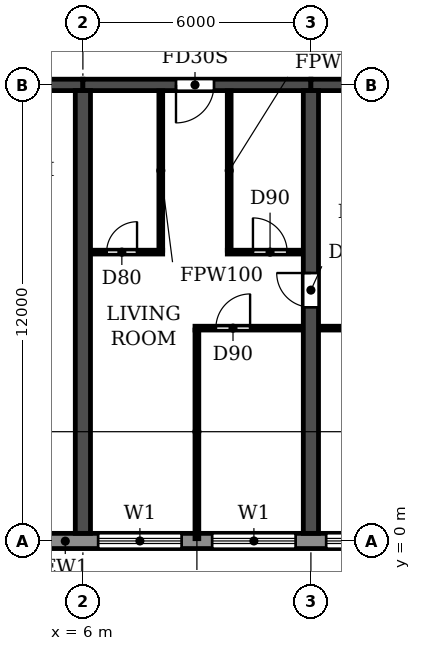
"""IFC4 building model, lengths in metres.
Left out: names, types, materials, properties, quantities, classifications, styles, units other than length and angle.
Written with IfcOpenShell. Run it as: python <this file> out.ifc"""

import sys

from ifc_helpers import new_model, si_unit, direction, frame, frame_2d, origin, place, context, subcontext, project, spatial, rectangle, extrude, element, fill, save


model = new_model("IFC4")
c1 = context("Model", 3, precision=1e-05, world=origin(), true_north=direction((0.0, 1.0)))
c2 = subcontext(c1, "Body", "Model", "MODEL_VIEW")
j1 = project(units=[si_unit("LENGTHUNIT", "METRE"), si_unit("PLANEANGLEUNIT", "RADIAN")], contexts=[c1])
p1 = place(None, origin())
s1 = spatial("IfcSite", under=j1, at=p1, CompositionType="ELEMENT")
p2 = place(p1, origin())
s2 = spatial("IfcBuilding", under=s1, at=p2, CompositionType="ELEMENT")
p3 = place(p2, frame((0.0, 0.0, 23.4)))
s3 = spatial("IfcBuildingStorey", under=s2, at=p3, CompositionType="ELEMENT", Elevation=23.4)
p4 = place(p3, frame((6.0, 0.2, 0.0), z_axis=(0.0, 0.0, 1.0), x_axis=(0.0, 1.0, 0.0)))
e1 = element("IfcWall", 1, at=p4, inside=s3, PredefinedType="SHEAR", context=c2, shape_type="SweptSolid", body=[
    extrude(rectangle(XDim=11.65, YDim=0.4, at=frame_2d((5.825, 0.0))), origin(), (0.0, 0.0, 1.0), 3.05),
])
p5 = place(p3, frame((12.0, 0.2, 0.0), z_axis=(0.0, 0.0, 1.0), x_axis=(0.0, 1.0, 0.0)))
e2 = element("IfcWall", 2, at=p5, inside=s3, PredefinedType="SHEAR", context=c2, shape_type="SweptSolid", body=[
    extrude(rectangle(XDim=11.65, YDim=0.4, at=frame_2d((5.825, 0.0))), origin(), (0.0, 0.0, 1.0), 3.05),
])
p6 = place(p5, frame((5.95, 0.0, 0.0)))
e3 = element("IfcOpeningElement", 3, at=p6, cuts=e2, PredefinedType="OPENING", context=c2, shape_type="SweptSolid", body=[
    extrude(rectangle(XDim=0.9, YDim=2.1, at=frame_2d((0.45, 1.05))), frame((0.0, 0.21, 0.0), z_axis=(0.0, -1.0, 0.0), x_axis=(1.0, 0.0, 0.0)), (0.0, 0.0, 1.0), 0.42),
])
p7 = place(p3, frame((0.2, 12.0, 0.0), z_axis=(0.0, 0.0, 1.0), x_axis=(1.0, 0.0, 0.0)))
e4 = element("IfcWall", 4, at=p7, inside=s3, PredefinedType="SHEAR", context=c2, shape_type="SweptSolid", body=[
    extrude(rectangle(XDim=5.8, YDim=0.3, at=frame_2d((2.9, 0.0))), origin(), (0.0, 0.0, 1.0), 2.45),
])
p8 = place(p7, frame((2.3, 0.0, 0.0)))
e5 = element("IfcOpeningElement", 5, at=p8, cuts=e4, PredefinedType="OPENING", context=c2, shape_type="SweptSolid", body=[
    extrude(rectangle(XDim=1.0, YDim=2.1, at=frame_2d((0.5, 1.05))), frame((0.0, 0.16, 0.0), z_axis=(0.0, -1.0, 0.0), x_axis=(1.0, 0.0, 0.0)), (0.0, 0.0, 1.0), 0.32),
])
p9 = place(p3, frame((6.0, 12.0, 0.0), z_axis=(0.0, 0.0, 1.0), x_axis=(1.0, 0.0, 0.0)))
e6 = element("IfcWall", 6, at=p9, inside=s3, PredefinedType="SHEAR", context=c2, shape_type="SweptSolid", body=[
    extrude(rectangle(XDim=6.0, YDim=0.3, at=frame_2d((3.0, 0.0))), origin(), (0.0, 0.0, 1.0), 2.45),
])
p10 = place(p9, frame((2.45, 0.0, 0.0)))
e7 = element("IfcOpeningElement", 7, at=p10, cuts=e6, PredefinedType="OPENING", context=c2, shape_type="SweptSolid", body=[
    extrude(rectangle(XDim=1.0, YDim=2.1, at=frame_2d((0.5, 1.05))), frame((0.0, 0.16, 0.0), z_axis=(0.0, -1.0, 0.0), x_axis=(1.0, 0.0, 0.0)), (0.0, 0.0, 1.0), 0.32),
])
p11 = place(p3, frame((12.0, 12.0, 0.0), z_axis=(0.0, 0.0, 1.0), x_axis=(1.0, 0.0, 0.0)))
e8 = element("IfcWall", 8, at=p11, inside=s3, PredefinedType="SHEAR", context=c2, shape_type="SweptSolid", body=[
    extrude(rectangle(XDim=6.0, YDim=0.3, at=frame_2d((3.0, 0.0))), origin(), (0.0, 0.0, 1.0), 2.45),
])
p12 = place(p3, frame((4.683, 0.0, 0.0), z_axis=(0.0, 0.0, 1.0), x_axis=(1.0, 0.0, 0.0)))
e9 = element("IfcWall", 9, at=p12, inside=s3, PredefinedType="STANDARD", context=c2, shape_type="SweptSolid", body=[
    extrude(rectangle(XDim=92.634, YDim=0.4, at=frame_2d((46.317, 0.0))), origin(), (0.0, 0.0, 1.0), 3.05),
])
p13 = place(p12, frame((1.717, 0.0, 0.9)))
e10 = element("IfcOpeningElement", 10, at=p13, cuts=e9, PredefinedType="OPENING", context=c2, shape_type="SweptSolid", body=[
    extrude(rectangle(XDim=2.2, YDim=1.5, at=frame_2d((1.1, 0.75))), frame((0.0, 0.21, 0.0), z_axis=(0.0, -1.0, 0.0), x_axis=(1.0, 0.0, 0.0)), (0.0, 0.0, 1.0), 0.42),
])
p14 = place(p12, frame((4.717, 0.0, 0.9)))
e11 = element("IfcOpeningElement", 11, at=p14, cuts=e9, PredefinedType="OPENING", context=c2, shape_type="SweptSolid", body=[
    extrude(rectangle(XDim=2.2, YDim=1.5, at=frame_2d((1.1, 0.75))), frame((0.0, 0.21, 0.0), z_axis=(0.0, -1.0, 0.0), x_axis=(1.0, 0.0, 0.0)), (0.0, 0.0, 1.0), 0.42),
])
p15 = place(p12, frame((7.717, 0.0, 0.9)))
e12 = element("IfcOpeningElement", 12, at=p15, cuts=e9, PredefinedType="OPENING", context=c2, shape_type="SweptSolid", body=[
    extrude(rectangle(XDim=2.2, YDim=1.5, at=frame_2d((1.1, 0.75))), frame((0.0, 0.21, 0.0), z_axis=(0.0, -1.0, 0.0), x_axis=(1.0, 0.0, 0.0)), (0.0, 0.0, 1.0), 0.42),
])
p16 = place(p12, frame((10.717, 0.0, 0.9)))
e13 = element("IfcOpeningElement", 13, at=p16, cuts=e9, PredefinedType="OPENING", context=c2, shape_type="SweptSolid", body=[
    extrude(rectangle(XDim=2.2, YDim=1.5, at=frame_2d((1.1, 0.75))), frame((0.0, 0.21, 0.0), z_axis=(0.0, -1.0, 0.0), x_axis=(1.0, 0.0, 0.0)), (0.0, 0.0, 1.0), 0.42),
])
p17 = place(p12, frame((13.717, 0.0, 0.9)))
e14 = element("IfcOpeningElement", 14, at=p17, cuts=e9, PredefinedType="OPENING", context=c2, shape_type="SweptSolid", body=[
    extrude(rectangle(XDim=2.2, YDim=1.5, at=frame_2d((1.1, 0.75))), frame((0.0, 0.21, 0.0), z_axis=(0.0, -1.0, 0.0), x_axis=(1.0, 0.0, 0.0)), (0.0, 0.0, 1.0), 0.42),
])
p18 = place(p12, frame((16.717, 0.0, 0.9)))
e15 = element("IfcOpeningElement", 15, at=p18, cuts=e9, PredefinedType="OPENING", context=c2, shape_type="SweptSolid", body=[
    extrude(rectangle(XDim=2.2, YDim=1.5, at=frame_2d((1.1, 0.75))), frame((0.0, 0.21, 0.0), z_axis=(0.0, -1.0, 0.0), x_axis=(1.0, 0.0, 0.0)), (0.0, 0.0, 1.0), 0.42),
])
p19 = place(p12, frame((19.917, 0.0, 0.0)))
e16 = element("IfcOpeningElement", 16, at=p19, cuts=e9, PredefinedType="OPENING", context=c2, shape_type="SweptSolid", body=[
    extrude(rectangle(XDim=1.8, YDim=2.4, at=frame_2d((0.9, 1.2))), frame((0.0, 0.21, 0.0), z_axis=(0.0, -1.0, 0.0), x_axis=(1.0, 0.0, 0.0)), (0.0, 0.0, 1.0), 0.42),
])
p20 = place(p12, frame((22.717, 0.0, 0.9)))
e17 = element("IfcOpeningElement", 17, at=p20, cuts=e9, PredefinedType="OPENING", context=c2, shape_type="SweptSolid", body=[
    extrude(rectangle(XDim=2.2, YDim=1.5, at=frame_2d((1.1, 0.75))), frame((0.0, 0.21, 0.0), z_axis=(0.0, -1.0, 0.0), x_axis=(1.0, 0.0, 0.0)), (0.0, 0.0, 1.0), 0.42),
])
p21 = place(p12, frame((25.717, 0.0, 0.9)))
e18 = element("IfcOpeningElement", 18, at=p21, cuts=e9, PredefinedType="OPENING", context=c2, shape_type="SweptSolid", body=[
    extrude(rectangle(XDim=2.2, YDim=1.5, at=frame_2d((1.1, 0.75))), frame((0.0, 0.21, 0.0), z_axis=(0.0, -1.0, 0.0), x_axis=(1.0, 0.0, 0.0)), (0.0, 0.0, 1.0), 0.42),
])
p22 = place(p12, frame((28.717, 0.0, 0.9)))
e19 = element("IfcOpeningElement", 19, at=p22, cuts=e9, PredefinedType="OPENING", context=c2, shape_type="SweptSolid", body=[
    extrude(rectangle(XDim=2.2, YDim=1.5, at=frame_2d((1.1, 0.75))), frame((0.0, 0.21, 0.0), z_axis=(0.0, -1.0, 0.0), x_axis=(1.0, 0.0, 0.0)), (0.0, 0.0, 1.0), 0.42),
])
p23 = place(p12, frame((31.917, 0.0, 0.0)))
e20 = element("IfcOpeningElement", 20, at=p23, cuts=e9, PredefinedType="OPENING", context=c2, shape_type="SweptSolid", body=[
    extrude(rectangle(XDim=1.8, YDim=2.4, at=frame_2d((0.9, 1.2))), frame((0.0, 0.21, 0.0), z_axis=(0.0, -1.0, 0.0), x_axis=(1.0, 0.0, 0.0)), (0.0, 0.0, 1.0), 0.42),
])
p24 = place(p12, frame((34.717, 0.0, 0.9)))
e21 = element("IfcOpeningElement", 21, at=p24, cuts=e9, PredefinedType="OPENING", context=c2, shape_type="SweptSolid", body=[
    extrude(rectangle(XDim=2.2, YDim=1.5, at=frame_2d((1.1, 0.75))), frame((0.0, 0.21, 0.0), z_axis=(0.0, -1.0, 0.0), x_axis=(1.0, 0.0, 0.0)), (0.0, 0.0, 1.0), 0.42),
])
p25 = place(p12, frame((37.717, 0.0, 0.9)))
e22 = element("IfcOpeningElement", 22, at=p25, cuts=e9, PredefinedType="OPENING", context=c2, shape_type="SweptSolid", body=[
    extrude(rectangle(XDim=2.2, YDim=1.5, at=frame_2d((1.1, 0.75))), frame((0.0, 0.21, 0.0), z_axis=(0.0, -1.0, 0.0), x_axis=(1.0, 0.0, 0.0)), (0.0, 0.0, 1.0), 0.42),
])
p26 = place(p12, frame((40.717, 0.0, 0.9)))
e23 = element("IfcOpeningElement", 23, at=p26, cuts=e9, PredefinedType="OPENING", context=c2, shape_type="SweptSolid", body=[
    extrude(rectangle(XDim=2.2, YDim=1.5, at=frame_2d((1.1, 0.75))), frame((0.0, 0.21, 0.0), z_axis=(0.0, -1.0, 0.0), x_axis=(1.0, 0.0, 0.0)), (0.0, 0.0, 1.0), 0.42),
])
p27 = place(p12, frame((43.917, 0.0, 0.0)))
e24 = element("IfcOpeningElement", 24, at=p27, cuts=e9, PredefinedType="OPENING", context=c2, shape_type="SweptSolid", body=[
    extrude(rectangle(XDim=1.8, YDim=2.4, at=frame_2d((0.9, 1.2))), frame((0.0, 0.21, 0.0), z_axis=(0.0, -1.0, 0.0), x_axis=(1.0, 0.0, 0.0)), (0.0, 0.0, 1.0), 0.42),
])
p28 = place(p12, frame((46.717, 0.0, 0.9)))
e25 = element("IfcOpeningElement", 25, at=p28, cuts=e9, PredefinedType="OPENING", context=c2, shape_type="SweptSolid", body=[
    extrude(rectangle(XDim=2.2, YDim=1.5, at=frame_2d((1.1, 0.75))), frame((0.0, 0.21, 0.0), z_axis=(0.0, -1.0, 0.0), x_axis=(1.0, 0.0, 0.0)), (0.0, 0.0, 1.0), 0.42),
])
p29 = place(p12, frame((49.717, 0.0, 0.9)))
e26 = element("IfcOpeningElement", 26, at=p29, cuts=e9, PredefinedType="OPENING", context=c2, shape_type="SweptSolid", body=[
    extrude(rectangle(XDim=2.2, YDim=1.5, at=frame_2d((1.1, 0.75))), frame((0.0, 0.21, 0.0), z_axis=(0.0, -1.0, 0.0), x_axis=(1.0, 0.0, 0.0)), (0.0, 0.0, 1.0), 0.42),
])
p30 = place(p12, frame((52.717, 0.0, 0.9)))
e27 = element("IfcOpeningElement", 27, at=p30, cuts=e9, PredefinedType="OPENING", context=c2, shape_type="SweptSolid", body=[
    extrude(rectangle(XDim=2.2, YDim=1.5, at=frame_2d((1.1, 0.75))), frame((0.0, 0.21, 0.0), z_axis=(0.0, -1.0, 0.0), x_axis=(1.0, 0.0, 0.0)), (0.0, 0.0, 1.0), 0.42),
])
p31 = place(p12, frame((55.717, 0.0, 0.9)))
e28 = element("IfcOpeningElement", 28, at=p31, cuts=e9, PredefinedType="OPENING", context=c2, shape_type="SweptSolid", body=[
    extrude(rectangle(XDim=2.2, YDim=1.5, at=frame_2d((1.1, 0.75))), frame((0.0, 0.21, 0.0), z_axis=(0.0, -1.0, 0.0), x_axis=(1.0, 0.0, 0.0)), (0.0, 0.0, 1.0), 0.42),
])
p32 = place(p12, frame((58.917, 0.0, 0.0)))
e29 = element("IfcOpeningElement", 29, at=p32, cuts=e9, PredefinedType="OPENING", context=c2, shape_type="SweptSolid", body=[
    extrude(rectangle(XDim=1.8, YDim=2.4, at=frame_2d((0.9, 1.2))), frame((0.0, 0.21, 0.0), z_axis=(0.0, -1.0, 0.0), x_axis=(1.0, 0.0, 0.0)), (0.0, 0.0, 1.0), 0.42),
])
p33 = place(p12, frame((61.717, 0.0, 0.9)))
e30 = element("IfcOpeningElement", 30, at=p33, cuts=e9, PredefinedType="OPENING", context=c2, shape_type="SweptSolid", body=[
    extrude(rectangle(XDim=2.2, YDim=1.5, at=frame_2d((1.1, 0.75))), frame((0.0, 0.21, 0.0), z_axis=(0.0, -1.0, 0.0), x_axis=(1.0, 0.0, 0.0)), (0.0, 0.0, 1.0), 0.42),
])
p34 = place(p12, frame((64.717, 0.0, 0.9)))
e31 = element("IfcOpeningElement", 31, at=p34, cuts=e9, PredefinedType="OPENING", context=c2, shape_type="SweptSolid", body=[
    extrude(rectangle(XDim=2.2, YDim=1.5, at=frame_2d((1.1, 0.75))), frame((0.0, 0.21, 0.0), z_axis=(0.0, -1.0, 0.0), x_axis=(1.0, 0.0, 0.0)), (0.0, 0.0, 1.0), 0.42),
])
p35 = place(p12, frame((67.717, 0.0, 0.9)))
e32 = element("IfcOpeningElement", 32, at=p35, cuts=e9, PredefinedType="OPENING", context=c2, shape_type="SweptSolid", body=[
    extrude(rectangle(XDim=2.2, YDim=1.5, at=frame_2d((1.1, 0.75))), frame((0.0, 0.21, 0.0), z_axis=(0.0, -1.0, 0.0), x_axis=(1.0, 0.0, 0.0)), (0.0, 0.0, 1.0), 0.42),
])
p36 = place(p12, frame((70.917, 0.0, 0.0)))
e33 = element("IfcOpeningElement", 33, at=p36, cuts=e9, PredefinedType="OPENING", context=c2, shape_type="SweptSolid", body=[
    extrude(rectangle(XDim=1.8, YDim=2.4, at=frame_2d((0.9, 1.2))), frame((0.0, 0.21, 0.0), z_axis=(0.0, -1.0, 0.0), x_axis=(1.0, 0.0, 0.0)), (0.0, 0.0, 1.0), 0.42),
])
p37 = place(p12, frame((73.717, 0.0, 0.9)))
e34 = element("IfcOpeningElement", 34, at=p37, cuts=e9, PredefinedType="OPENING", context=c2, shape_type="SweptSolid", body=[
    extrude(rectangle(XDim=2.2, YDim=1.5, at=frame_2d((1.1, 0.75))), frame((0.0, 0.21, 0.0), z_axis=(0.0, -1.0, 0.0), x_axis=(1.0, 0.0, 0.0)), (0.0, 0.0, 1.0), 0.42),
])
p38 = place(p12, frame((76.717, 0.0, 0.9)))
e35 = element("IfcOpeningElement", 35, at=p38, cuts=e9, PredefinedType="OPENING", context=c2, shape_type="SweptSolid", body=[
    extrude(rectangle(XDim=2.2, YDim=1.5, at=frame_2d((1.1, 0.75))), frame((0.0, 0.21, 0.0), z_axis=(0.0, -1.0, 0.0), x_axis=(1.0, 0.0, 0.0)), (0.0, 0.0, 1.0), 0.42),
])
p39 = place(p12, frame((79.717, 0.0, 0.9)))
e36 = element("IfcOpeningElement", 36, at=p39, cuts=e9, PredefinedType="OPENING", context=c2, shape_type="SweptSolid", body=[
    extrude(rectangle(XDim=2.2, YDim=1.5, at=frame_2d((1.1, 0.75))), frame((0.0, 0.21, 0.0), z_axis=(0.0, -1.0, 0.0), x_axis=(1.0, 0.0, 0.0)), (0.0, 0.0, 1.0), 0.42),
])
p40 = place(p12, frame((82.717, 0.0, 0.9)))
e37 = element("IfcOpeningElement", 37, at=p40, cuts=e9, PredefinedType="OPENING", context=c2, shape_type="SweptSolid", body=[
    extrude(rectangle(XDim=2.2, YDim=1.5, at=frame_2d((1.1, 0.75))), frame((0.0, 0.21, 0.0), z_axis=(0.0, -1.0, 0.0), x_axis=(1.0, 0.0, 0.0)), (0.0, 0.0, 1.0), 0.42),
])
p41 = place(p12, frame((85.717, 0.0, 0.9)))
e38 = element("IfcOpeningElement", 38, at=p41, cuts=e9, PredefinedType="OPENING", context=c2, shape_type="SweptSolid", body=[
    extrude(rectangle(XDim=2.2, YDim=1.5, at=frame_2d((1.1, 0.75))), frame((0.0, 0.21, 0.0), z_axis=(0.0, -1.0, 0.0), x_axis=(1.0, 0.0, 0.0)), (0.0, 0.0, 1.0), 0.42),
])
p42 = place(p12, frame((88.717, 0.0, 0.9)))
e39 = element("IfcOpeningElement", 39, at=p42, cuts=e9, PredefinedType="OPENING", context=c2, shape_type="SweptSolid", body=[
    extrude(rectangle(XDim=2.2, YDim=1.5, at=frame_2d((1.1, 0.75))), frame((0.0, 0.21, 0.0), z_axis=(0.0, -1.0, 0.0), x_axis=(1.0, 0.0, 0.0)), (0.0, 0.0, 1.0), 0.42),
])
p43 = place(p3, frame((8.95, 5.6, 0.0), z_axis=(0.0, 0.0, 1.0), x_axis=(1.0, 0.0, 0.0)))
e40 = element("IfcWall", 40, at=p43, inside=s3, PredefinedType="PARTITIONING", context=c2, shape_type="SweptSolid", body=[
    extrude(rectangle(XDim=2.84, YDim=0.1, at=frame_2d((1.42, 0.0))), origin(), (0.0, 0.0, 1.0), 3.05),
])
p44 = place(p43, frame((0.55, 0.0, 0.0)))
e41 = element("IfcOpeningElement", 41, at=p44, cuts=e40, PredefinedType="OPENING", context=c2, shape_type="SweptSolid", body=[
    extrude(rectangle(XDim=0.9, YDim=2.1, at=frame_2d((0.45, 1.05))), frame((0.0, 0.06, 0.0), z_axis=(0.0, -1.0, 0.0), x_axis=(1.0, 0.0, 0.0)), (0.0, 0.0, 1.0), 0.12),
])
p45 = place(p3, frame((12.21, 5.6, 0.0), z_axis=(0.0, 0.0, 1.0), x_axis=(1.0, 0.0, 0.0)))
e42 = element("IfcWall", 42, at=p45, inside=s3, PredefinedType="PARTITIONING", context=c2, shape_type="SweptSolid", body=[
    extrude(rectangle(XDim=5.58, YDim=0.1, at=frame_2d((2.79, 0.0))), origin(), (0.0, 0.0, 1.0), 3.05),
])
p46 = place(p45, frame((1.39, 0.0, 0.0)))
e43 = element("IfcOpeningElement", 43, at=p46, cuts=e42, PredefinedType="OPENING", context=c2, shape_type="SweptSolid", body=[
    extrude(rectangle(XDim=0.9, YDim=2.1, at=frame_2d((0.45, 1.05))), frame((0.0, 0.06, 0.0), z_axis=(0.0, -1.0, 0.0), x_axis=(1.0, 0.0, 0.0)), (0.0, 0.0, 1.0), 0.12),
])
p47 = place(p45, frame((3.29, 0.0, 0.0)))
e44 = element("IfcOpeningElement", 44, at=p47, cuts=e42, PredefinedType="OPENING", context=c2, shape_type="SweptSolid", body=[
    extrude(rectangle(XDim=0.9, YDim=2.1, at=frame_2d((0.45, 1.05))), frame((0.0, 0.06, 0.0), z_axis=(0.0, -1.0, 0.0), x_axis=(1.0, 0.0, 0.0)), (0.0, 0.0, 1.0), 0.12),
])
p48 = place(p3, frame((6.21, 7.6, 0.0), z_axis=(0.0, 0.0, 1.0), x_axis=(1.0, 0.0, 0.0)))
e45 = element("IfcWall", 45, at=p48, inside=s3, PredefinedType="PARTITIONING", context=c2, shape_type="SweptSolid", body=[
    extrude(rectangle(XDim=1.89, YDim=0.1, at=frame_2d((0.945, 0.0))), origin(), (0.0, 0.0, 1.0), 3.05),
])
p49 = place(p48, frame((0.415, 0.0, 0.0)))
e46 = element("IfcOpeningElement", 46, at=p49, cuts=e45, PredefinedType="OPENING", context=c2, shape_type="SweptSolid", body=[
    extrude(rectangle(XDim=0.8, YDim=2.1, at=frame_2d((0.4, 1.05))), frame((0.0, 0.06, 0.0), z_axis=(0.0, -1.0, 0.0), x_axis=(1.0, 0.0, 0.0)), (0.0, 0.0, 1.0), 0.12),
])
p50 = place(p3, frame((9.8, 7.6, 0.0), z_axis=(0.0, 0.0, 1.0), x_axis=(1.0, 0.0, 0.0)))
e47 = element("IfcWall", 47, at=p50, inside=s3, PredefinedType="PARTITIONING", context=c2, shape_type="SweptSolid", body=[
    extrude(rectangle(XDim=1.99, YDim=0.1, at=frame_2d((0.995, 0.0))), origin(), (0.0, 0.0, 1.0), 3.05),
])
p51 = place(p50, frame((0.675, 0.0, 0.0)))
e48 = element("IfcOpeningElement", 48, at=p51, cuts=e47, PredefinedType="OPENING", context=c2, shape_type="SweptSolid", body=[
    extrude(rectangle(XDim=0.9, YDim=2.1, at=frame_2d((0.45, 1.05))), frame((0.0, 0.06, 0.0), z_axis=(0.0, -1.0, 0.0), x_axis=(1.0, 0.0, 0.0)), (0.0, 0.0, 1.0), 0.12),
])
p52 = place(p3, frame((8.05, 7.65, 0.0), z_axis=(0.0, 0.0, 1.0), x_axis=(0.0, 1.0, 0.0)))
e49 = element("IfcWall", 49, at=p52, inside=s3, PredefinedType="PARTITIONING", context=c2, shape_type="SweptSolid", body=[
    extrude(rectangle(XDim=4.19, YDim=0.1, at=frame_2d((2.095, 0.0))), origin(), (0.0, 0.0, 1.0), 3.05),
])
p53 = place(p3, frame((9.0, 0.06, 0.0), z_axis=(0.0, 0.0, 1.0), x_axis=(0.0, 1.0, 0.0)))
e50 = element("IfcWall", 50, at=p53, inside=s3, PredefinedType="PARTITIONING", context=c2, shape_type="SweptSolid", body=[
    extrude(rectangle(XDim=5.49, YDim=0.1, at=frame_2d((2.745, 0.0))), origin(), (0.0, 0.0, 1.0), 3.05),
])
p54 = place(p3, frame((9.85, 7.65, 0.0), z_axis=(0.0, 0.0, 1.0), x_axis=(0.0, 1.0, 0.0)))
e51 = element("IfcWall", 51, at=p54, inside=s3, PredefinedType="PARTITIONING", context=c2, shape_type="SweptSolid", body=[
    extrude(rectangle(XDim=4.19, YDim=0.1, at=frame_2d((2.095, 0.0))), origin(), (0.0, 0.0, 1.0), 3.05),
])
p55 = place(p13, origin())
e52 = element("IfcWindow", 52, at=p55, inside=s3, PartitioningType="DOUBLE_PANEL_HORIZONTAL", PredefinedType="WINDOW", context=c2, shape_type="SweptSolid", body=[
    extrude(rectangle(XDim=2.2, YDim=1.5, at=frame_2d((1.1, 0.75))), frame((0.0, 0.03, 0.0), z_axis=(0.0, -1.0, 0.0), x_axis=(1.0, 0.0, 0.0)), (0.0, 0.0, 1.0), 0.06),
])
fill(e10, e52)
p56 = place(p14, origin())
e53 = element("IfcWindow", 53, at=p56, inside=s3, PartitioningType="DOUBLE_PANEL_HORIZONTAL", PredefinedType="WINDOW", context=c2, shape_type="SweptSolid", body=[
    extrude(rectangle(XDim=2.2, YDim=1.5, at=frame_2d((1.1, 0.75))), frame((0.0, 0.03, 0.0), z_axis=(0.0, -1.0, 0.0), x_axis=(1.0, 0.0, 0.0)), (0.0, 0.0, 1.0), 0.06),
])
fill(e11, e53)
p57 = place(p15, origin())
e54 = element("IfcWindow", 54, at=p57, inside=s3, PartitioningType="DOUBLE_PANEL_HORIZONTAL", PredefinedType="WINDOW", context=c2, shape_type="SweptSolid", body=[
    extrude(rectangle(XDim=2.2, YDim=1.5, at=frame_2d((1.1, 0.75))), frame((0.0, 0.03, 0.0), z_axis=(0.0, -1.0, 0.0), x_axis=(1.0, 0.0, 0.0)), (0.0, 0.0, 1.0), 0.06),
])
fill(e12, e54)
p58 = place(p49, origin())
e55 = element("IfcDoor", 55, at=p58, inside=s3, OperationType="SINGLE_SWING_RIGHT", PredefinedType="DOOR", context=c2, shape_type="SweptSolid", body=[
    extrude(rectangle(XDim=0.8, YDim=2.1, at=frame_2d((0.4, 1.05))), frame((0.0, 0.025, 0.0), z_axis=(0.0, -1.0, 0.0), x_axis=(1.0, 0.0, 0.0)), (0.0, 0.0, 1.0), 0.05),
])
fill(e46, e55)
p59 = place(p10, frame((1.0, 0.0, 0.0), z_axis=(0.0, 0.0, 1.0), x_axis=(-1.0, 0.0, 0.0)))
e56 = element("IfcDoor", 56, at=p59, inside=s3, OperationType="SINGLE_SWING_RIGHT", PredefinedType="DOOR", context=c2, shape_type="SweptSolid", body=[
    extrude(rectangle(XDim=1.0, YDim=2.1, at=frame_2d((0.5, 1.05))), frame((0.0, 0.025, 0.0), z_axis=(0.0, -1.0, 0.0), x_axis=(1.0, 0.0, 0.0)), (0.0, 0.0, 1.0), 0.05),
])
fill(e7, e56)
p60 = place(p44, origin())
e57 = element("IfcDoor", 57, at=p60, inside=s3, OperationType="SINGLE_SWING_RIGHT", PredefinedType="DOOR", context=c2, shape_type="SweptSolid", body=[
    extrude(rectangle(XDim=0.9, YDim=2.1, at=frame_2d((0.45, 1.05))), frame((0.0, 0.025, 0.0), z_axis=(0.0, -1.0, 0.0), x_axis=(1.0, 0.0, 0.0)), (0.0, 0.0, 1.0), 0.05),
])
fill(e41, e57)
p61 = place(p51, origin())
e58 = element("IfcDoor", 58, at=p61, inside=s3, OperationType="SINGLE_SWING_LEFT", PredefinedType="DOOR", context=c2, shape_type="SweptSolid", body=[
    extrude(rectangle(XDim=0.9, YDim=2.1, at=frame_2d((0.45, 1.05))), frame((0.0, 0.025, 0.0), z_axis=(0.0, -1.0, 0.0), x_axis=(1.0, 0.0, 0.0)), (0.0, 0.0, 1.0), 0.05),
])
fill(e48, e58)
p62 = place(p6, origin())
e59 = element("IfcDoor", 59, at=p62, inside=s3, OperationType="SINGLE_SWING_RIGHT", PredefinedType="DOOR", context=c2, shape_type="SweptSolid", body=[
    extrude(rectangle(XDim=0.9, YDim=2.1, at=frame_2d((0.45, 1.05))), frame((0.0, 0.025, 0.0), z_axis=(0.0, -1.0, 0.0), x_axis=(1.0, 0.0, 0.0)), (0.0, 0.0, 1.0), 0.05),
])
fill(e3, e59)
save(model, sys.argv[1])
